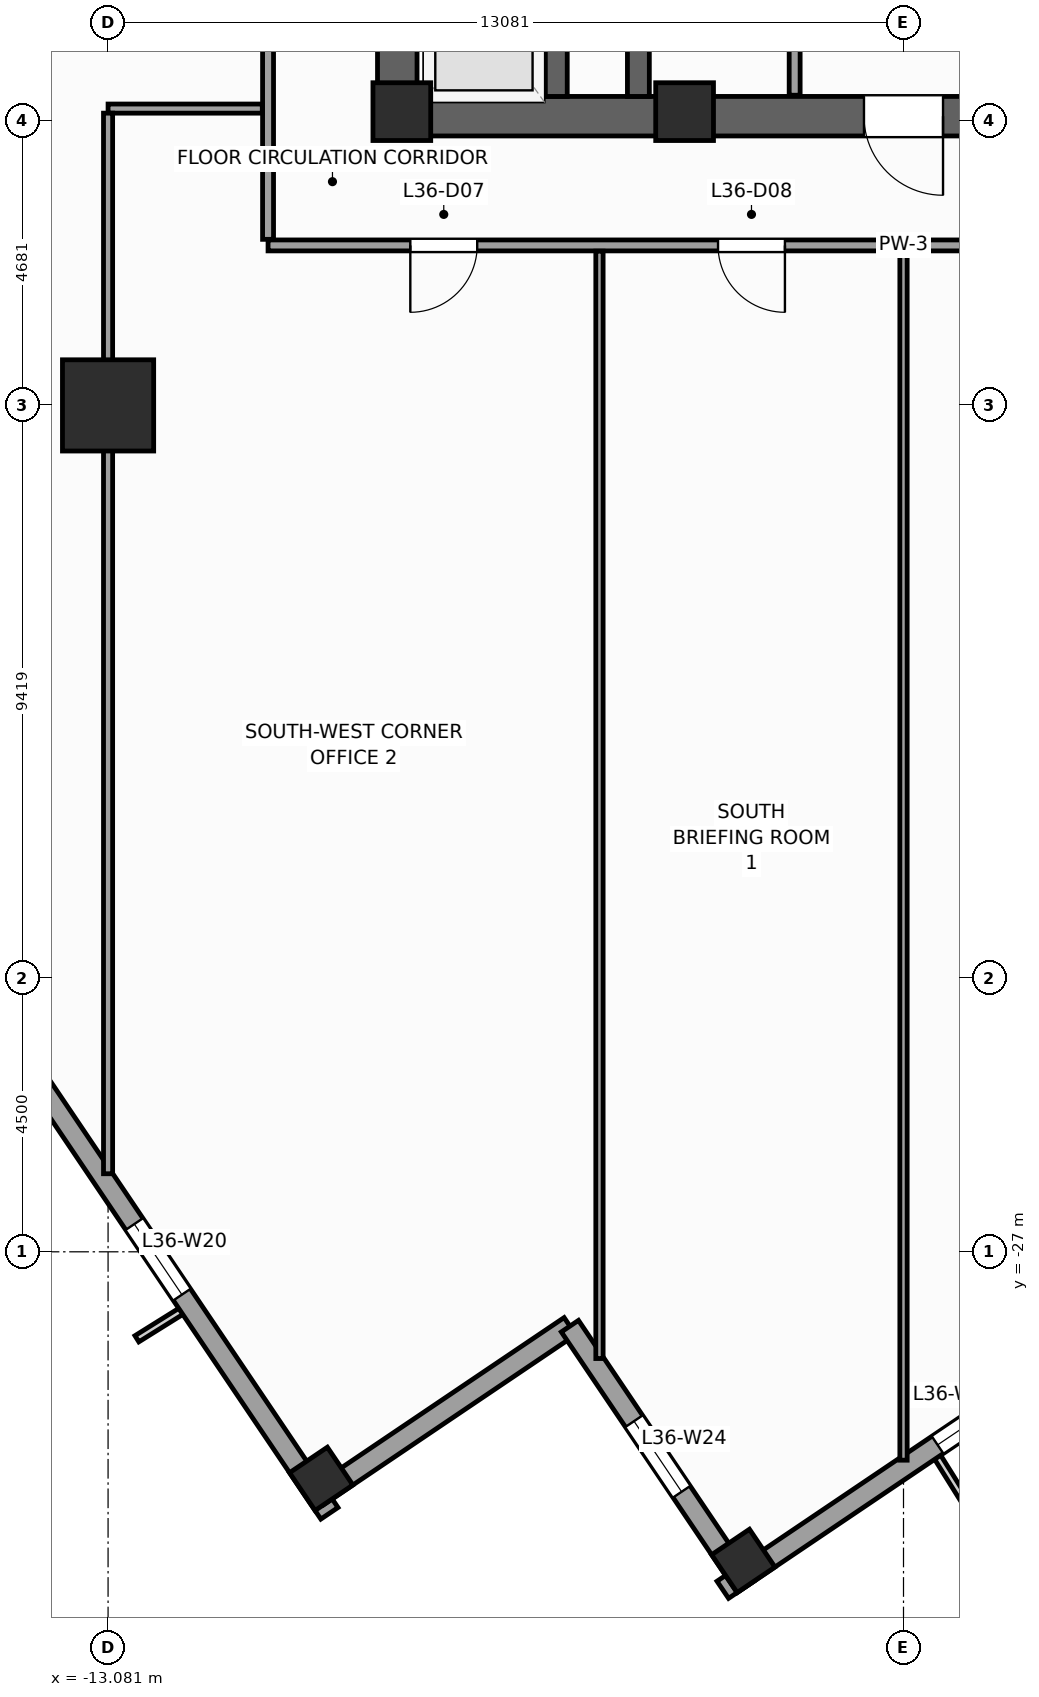
"""IFC4 building model, lengths in metres.
Left out: names, types, materials, properties, quantities, classifications, styles, units other than length and angle.
Written with IfcOpenShell. Run it as: python <this file> out.ifc"""

import sys

from ifc_helpers import new_model, si_unit, direction, frame, frame_2d, origin, origin_2d, place, context, subcontext, project, spatial, rectangle, extrude, source, transform, mapped, element, fill, save


model = new_model("IFC4")
c1 = context("Model", 3, precision=1e-05, world=origin(), true_north=direction((0.0, 1.0)))
c2 = subcontext(c1, "Body", "Model", "MODEL_VIEW")
j1 = project(units=[si_unit("LENGTHUNIT", "METRE"), si_unit("PLANEANGLEUNIT", "RADIAN")], contexts=[c1])
p1 = place(None, origin())
s1 = spatial("IfcSite", under=j1, at=p1, CompositionType="ELEMENT")
p2 = place(p1, origin())
s2 = spatial("IfcBuilding", under=s1, at=p2, CompositionType="ELEMENT")
p3 = place(p2, frame((0.0, 0.0, 152.4)))
s3 = spatial("IfcBuildingStorey", under=s2, at=p3, CompositionType="ELEMENT", Elevation=152.4)
p4 = place(p3, frame((-8.65, -8.325, 0.0), z_axis=(0.0, 0.0, 1.0), x_axis=(1.0, 0.0, 0.0)))
e1 = element("IfcWall", 1, at=p4, inside=s3, PredefinedType="SHEAR", context=c2, shape_type="SweptSolid", body=[
    extrude(rectangle(XDim=17.3, YDim=0.65, at=frame_2d((8.65, 0.0))), origin(), (0.0, 0.0, 1.0), 4.0),
])
p5 = place(p4, frame((8.0, 0.0, 0.0)))
e2 = element("IfcOpeningElement", 2, at=p5, cuts=e1, PredefinedType="OPENING", context=c2, shape_type="SweptSolid", body=[
    extrude(rectangle(XDim=1.3, YDim=2.2, at=frame_2d((0.65, 1.1))), frame((0.0, 0.335, 0.0), z_axis=(0.0, -1.0, 0.0), x_axis=(1.0, 0.0, 0.0)), (0.0, 0.0, 1.0), 0.67),
])
p6 = place(p3, frame((-8.325, -8.0, 0.0), z_axis=(0.0, 0.0, 1.0), x_axis=(0.0, 1.0, 0.0)))
e3 = element("IfcWall", 3, at=p6, inside=s3, PredefinedType="SHEAR", context=c2, shape_type="SweptSolid", body=[
    extrude(rectangle(XDim=16.0, YDim=0.65, at=frame_2d((8.0, 0.0))), origin(), (0.0, 0.0, 1.0), 4.0),
])
p7 = place(p6, frame((4.69, 0.0, 0.0)))
e4 = element("IfcOpeningElement", 4, at=p7, cuts=e3, PredefinedType="OPENING", context=c2, shape_type="SweptSolid", body=[
    extrude(rectangle(XDim=1.3, YDim=2.2, at=frame_2d((0.65, 1.1))), frame((0.0, 0.335, 0.0), z_axis=(0.0, -1.0, 0.0), x_axis=(1.0, 0.0, 0.0)), (0.0, 0.0, 1.0), 0.67),
])
p8 = place(p3, frame((-4.36, -8.0, 0.0), z_axis=(0.0, 0.0, 1.0), x_axis=(0.0, 1.0, 0.0)))
e5 = element("IfcWall", 5, at=p8, inside=s3, PredefinedType="SHEAR", context=c2, shape_type="SweptSolid", body=[
    extrude(rectangle(XDim=16.0, YDim=0.36, at=frame_2d((8.0, 0.0))), origin(), (0.0, 0.0, 1.0), 4.0),
])
p9 = place(p3, frame((-5.71, -8.0, 0.0), z_axis=(0.0, 0.0, 1.0), x_axis=(0.0, 1.0, 0.0)))
e6 = element("IfcWall", 6, at=p9, inside=s3, PredefinedType="SHEAR", context=c2, shape_type="SweptSolid", body=[
    extrude(rectangle(XDim=2.54, YDim=0.36, at=frame_2d((1.27, 0.0))), origin(), (0.0, 0.0, 1.0), 4.0),
])
m1 = source(origin(), c2, "Body", "SweptSolid", [
    extrude(rectangle(XDim=0.95, YDim=0.95, at=origin_2d()), origin(), (0.0, 0.0, 1.0), 4.0),
])
for number, where, z_axis, x_axis in (
    (7, (-8.25, -8.25, 0.0), (0.0, 0.0, 1.0), (1.0, 0.0, 0.0)),
    (8, (-3.6, -8.25, 0.0), (0.0, 0.0, 1.0), (1.0, 0.0, 0.0)),
):
    element("IfcColumn", number, at=place(p3, frame(where, z_axis=z_axis, x_axis=x_axis)), inside=s3, PredefinedType="PILASTER", context=c2, shape_type="MappedRepresentation", body=[
        mapped(m1, transform((0.0, 0.0, 0.0), scale=1.0)),
    ])
m2 = source(origin(), c2, "Body", "SweptSolid", [
    extrude(rectangle(XDim=1.5, YDim=1.5, at=origin_2d()), origin(), (0.0, 0.0, 1.0), 4.0),
])
p10 = place(p3, frame((-13.081, -13.081, 0.0), z_axis=(0.0, 0.0, 1.0), x_axis=(1.0, 0.0, 0.0)))
e9 = element("IfcColumn", 9, at=p10, inside=s3, PredefinedType="COLUMN", context=c2, shape_type="MappedRepresentation", body=[
    mapped(m2, transform((0.0, 0.0, 0.0), scale=1.0)),
])
m3 = source(origin(), c2, "Body", "SweptSolid", [
    extrude(rectangle(XDim=0.75, YDim=0.75, at=origin_2d()), origin(), (0.0, 0.0, 1.0), 4.0),
])
for number, where, z_axis, x_axis in (
    (10, (-2.635, -32.083, 0.0), (0.0, 0.0, 1.0), (0.829, 0.559, 0.0)),
    (11, (-9.576, -30.734, 0.0), (0.0, 0.0, 1.0), (0.829, 0.559, 0.0)),
):
    element("IfcColumn", number, at=place(p3, frame(where, z_axis=z_axis, x_axis=x_axis)), inside=s3, PredefinedType="COLUMN", context=c2, shape_type="MappedRepresentation", body=[
        mapped(m3, transform((0.0, 0.0, 0.0), scale=1.0)),
    ])
p11 = place(p3, frame((-2.972, -32.558, 0.0), z_axis=(0.0, 0.0, 1.0), x_axis=(0.829036218961, 0.559194910251, 0.0)))
e12 = element("IfcWall", 12, at=p11, inside=s3, PredefinedType="STANDARD", context=c2, shape_type="SweptSolid", body=[
    extrude(rectangle(XDim=41.34, YDim=0.34, at=frame_2d((20.67, 0.0))), origin(), (0.0, 0.0, 1.0), 3.04),
])
p12 = place(p11, frame((14.545, 0.0, 0.0)))
e13 = element("IfcOpeningElement", 13, at=p12, cuts=e12, PredefinedType="OPENING", context=c2, shape_type="SweptSolid", body=[
    extrude(rectangle(XDim=1.05, YDim=2.25, at=frame_2d((0.525, 1.125))), frame((0.0, 0.18, 0.0), z_axis=(0.0, -1.0, 0.0), x_axis=(1.0, 0.0, 0.0)), (0.0, 0.0, 1.0), 0.36),
])
p13 = place(p11, frame((4.261, 0.0, 0.56)))
e14 = element("IfcOpeningElement", 14, at=p13, cuts=e12, PredefinedType="OPENING", context=c2, shape_type="SweptSolid", body=[
    extrude(rectangle(XDim=1.4, YDim=2.4, at=frame_2d((0.7, 1.2))), frame((0.0, 0.18, 0.0), z_axis=(0.0, -1.0, 0.0), x_axis=(1.0, 0.0, 0.0)), (0.0, 0.0, 1.0), 0.36),
])
p14 = place(p11, frame((11.064, 0.0, 0.61)))
e15 = element("IfcOpeningElement", 15, at=p14, cuts=e12, PredefinedType="OPENING", context=c2, shape_type="SweptSolid", body=[
    extrude(rectangle(XDim=1.85, YDim=2.35, at=frame_2d((0.925, 1.175))), frame((0.0, 0.18, 0.0), z_axis=(0.0, -1.0, 0.0), x_axis=(1.0, 0.0, 0.0)), (0.0, 0.0, 1.0), 0.36),
])
p15 = place(p11, frame((18.168, 0.0, 0.61)))
e16 = element("IfcOpeningElement", 16, at=p15, cuts=e12, PredefinedType="OPENING", context=c2, shape_type="SweptSolid", body=[
    extrude(rectangle(XDim=1.85, YDim=2.35, at=frame_2d((0.925, 1.175))), frame((0.0, 0.18, 0.0), z_axis=(0.0, -1.0, 0.0), x_axis=(1.0, 0.0, 0.0)), (0.0, 0.0, 1.0), 0.36),
])
p16 = place(p11, frame((27.186, 0.0, 0.61)))
e17 = element("IfcOpeningElement", 17, at=p16, cuts=e12, PredefinedType="OPENING", context=c2, shape_type="SweptSolid", body=[
    extrude(rectangle(XDim=1.85, YDim=2.35, at=frame_2d((0.925, 1.175))), frame((0.0, 0.18, 0.0), z_axis=(0.0, -1.0, 0.0), x_axis=(1.0, 0.0, 0.0)), (0.0, 0.0, 1.0), 0.36),
])
p17 = place(p11, frame((34.852, 0.0, 0.56)))
e18 = element("IfcOpeningElement", 18, at=p17, cuts=e12, PredefinedType="OPENING", context=c2, shape_type="SweptSolid", body=[
    extrude(rectangle(XDim=1.4, YDim=2.4, at=frame_2d((0.7, 1.2))), frame((0.0, 0.18, 0.0), z_axis=(0.0, -1.0, 0.0), x_axis=(1.0, 0.0, 0.0)), (0.0, 0.0, 1.0), 0.36),
])
p18 = place(p3, frame((-32.558, 2.972, 0.0), z_axis=(0.0, 0.0, 1.0), x_axis=(0.559194910251, -0.829036218961, 0.0)))
e19 = element("IfcWall", 19, at=p18, inside=s3, PredefinedType="STANDARD", context=c2, shape_type="SweptSolid", body=[
    extrude(rectangle(XDim=41.34, YDim=0.34, at=frame_2d((20.67, 0.0))), origin(), (0.0, 0.0, 1.0), 3.04),
])
p19 = place(p18, frame((3.511, 0.0, 0.56)))
e20 = element("IfcOpeningElement", 20, at=p19, cuts=e19, PredefinedType="OPENING", context=c2, shape_type="SweptSolid", body=[
    extrude(rectangle(XDim=1.4, YDim=2.4, at=frame_2d((0.7, 1.2))), frame((0.0, 0.18, 0.0), z_axis=(0.0, -1.0, 0.0), x_axis=(1.0, 0.0, 0.0)), (0.0, 0.0, 1.0), 0.36),
])
p20 = place(p18, frame((11.064, 0.0, 0.61)))
e21 = element("IfcOpeningElement", 21, at=p20, cuts=e19, PredefinedType="OPENING", context=c2, shape_type="SweptSolid", body=[
    extrude(rectangle(XDim=1.85, YDim=2.35, at=frame_2d((0.925, 1.175))), frame((0.0, 0.18, 0.0), z_axis=(0.0, -1.0, 0.0), x_axis=(1.0, 0.0, 0.0)), (0.0, 0.0, 1.0), 0.36),
])
p21 = place(p18, frame((18.168, 0.0, 0.61)))
e22 = element("IfcOpeningElement", 22, at=p21, cuts=e19, PredefinedType="OPENING", context=c2, shape_type="SweptSolid", body=[
    extrude(rectangle(XDim=1.85, YDim=2.35, at=frame_2d((0.925, 1.175))), frame((0.0, 0.18, 0.0), z_axis=(0.0, -1.0, 0.0), x_axis=(1.0, 0.0, 0.0)), (0.0, 0.0, 1.0), 0.36),
])
p22 = place(p18, frame((27.186, 0.0, 0.61)))
e23 = element("IfcOpeningElement", 23, at=p22, cuts=e19, PredefinedType="OPENING", context=c2, shape_type="SweptSolid", body=[
    extrude(rectangle(XDim=1.85, YDim=2.35, at=frame_2d((0.925, 1.175))), frame((0.0, 0.18, 0.0), z_axis=(0.0, -1.0, 0.0), x_axis=(1.0, 0.0, 0.0)), (0.0, 0.0, 1.0), 0.36),
])
p23 = place(p18, frame((35.602, 0.0, 0.56)))
e24 = element("IfcOpeningElement", 24, at=p23, cuts=e19, PredefinedType="OPENING", context=c2, shape_type="SweptSolid", body=[
    extrude(rectangle(XDim=1.4, YDim=2.4, at=frame_2d((0.7, 1.2))), frame((0.0, 0.18, 0.0), z_axis=(0.0, -1.0, 0.0), x_axis=(1.0, 0.0, 0.0)), (0.0, 0.0, 1.0), 0.36),
])
p24 = place(p3, frame((-9.631, -31.019, 0.0), z_axis=(0.0, 0.0, 1.0), x_axis=(0.829025804298, 0.559210350234, 0.0)))
e25 = element("IfcWall", 25, at=p24, inside=s3, PredefinedType="STANDARD", context=c2, shape_type="SweptSolid", body=[
    extrude(rectangle(XDim=5.0, YDim=0.34, at=frame_2d((2.5, 0.0))), origin(), (0.0, 0.0, 1.0), 3.74),
])
p25 = place(p3, frame((-5.486, -28.223, 0.0), z_axis=(0.0, 0.0, 1.0), x_axis=(0.559171107879, -0.82905227345, 0.0)))
e26 = element("IfcWall", 26, at=p25, inside=s3, PredefinedType="STANDARD", context=c2, shape_type="SweptSolid", body=[
    extrude(rectangle(XDim=5.17, YDim=0.34, at=frame_2d((2.585, 0.0))), origin(), (0.0, 0.0, 1.0), 3.04),
])
p26 = place(p25, frame((1.885, 0.0, 0.56)))
e27 = element("IfcOpeningElement", 27, at=p26, cuts=e26, PredefinedType="OPENING", context=c2, shape_type="SweptSolid", body=[
    extrude(rectangle(XDim=1.4, YDim=2.4, at=frame_2d((0.7, 1.2))), frame((0.0, 0.18, 0.0), z_axis=(0.0, -1.0, 0.0), x_axis=(1.0, 0.0, 0.0)), (0.0, 0.0, 1.0), 0.36),
])
p27 = place(p3, frame((-1.79, -7.98, 0.0), z_axis=(0.0, 0.0, 1.0), x_axis=(0.0, 1.0, 0.0)))
e28 = element("IfcWall", 28, at=p27, inside=s3, PredefinedType="PARTITIONING", context=c2, shape_type="SweptSolid", body=[
    extrude(rectangle(XDim=12.38, YDim=0.18, at=frame_2d((6.19, 0.0))), origin(), (0.0, 0.0, 1.0), 3.74),
])
p28 = place(p27, frame((4.6, 0.0, 0.0)))
e29 = element("IfcOpeningElement", 29, at=p28, cuts=e28, PredefinedType="OPENING", context=c2, shape_type="SweptSolid", body=[
    extrude(rectangle(XDim=1.1, YDim=2.2, at=frame_2d((0.55, 1.1))), frame((0.0, 0.1, 0.0), z_axis=(0.0, -1.0, 0.0), x_axis=(1.0, 0.0, 0.0)), (0.0, 0.0, 1.0), 0.2),
])
p29 = place(p27, frame((6.66, 0.0, 0.0)))
e30 = element("IfcOpeningElement", 30, at=p29, cuts=e28, PredefinedType="OPENING", context=c2, shape_type="SweptSolid", body=[
    extrude(rectangle(XDim=1.1, YDim=2.2, at=frame_2d((0.55, 1.1))), frame((0.0, 0.1, 0.0), z_axis=(0.0, -1.0, 0.0), x_axis=(1.0, 0.0, 0.0)), (0.0, 0.0, 1.0), 0.2),
])
p30 = place(p27, frame((1.4, 0.0, 0.0)))
e31 = element("IfcOpeningElement", 31, at=p30, cuts=e28, PredefinedType="OPENING", context=c2, shape_type="SweptSolid", body=[
    extrude(rectangle(XDim=1.15, YDim=2.25, at=frame_2d((0.575, 1.125))), frame((0.0, 0.1, 0.0), z_axis=(0.0, -1.0, 0.0), x_axis=(1.0, 0.0, 0.0)), (0.0, 0.0, 1.0), 0.2),
])
p31 = place(p3, frame((-10.45, -10.45, 0.0), z_axis=(0.0, 0.0, 1.0), x_axis=(1.0, 0.0, 0.0)))
e32 = element("IfcWall", 32, at=p31, inside=s3, PredefinedType="PARTITIONING", context=c2, shape_type="SweptSolid", body=[
    extrude(rectangle(XDim=20.9, YDim=0.18, at=frame_2d((10.45, 0.0))), origin(), (0.0, 0.0, 1.0), 3.74),
])
p32 = place(p31, frame((2.339, 0.0, 0.0)))
e33 = element("IfcOpeningElement", 33, at=p32, cuts=e32, PredefinedType="OPENING", context=c2, shape_type="SweptSolid", body=[
    extrude(rectangle(XDim=1.1, YDim=2.2, at=frame_2d((0.55, 1.1))), frame((0.0, 0.1, 0.0), z_axis=(0.0, -1.0, 0.0), x_axis=(1.0, 0.0, 0.0)), (0.0, 0.0, 1.0), 0.2),
])
p33 = place(p31, frame((7.4, 0.0, 0.0)))
e34 = element("IfcOpeningElement", 34, at=p33, cuts=e32, PredefinedType="OPENING", context=c2, shape_type="SweptSolid", body=[
    extrude(rectangle(XDim=1.1, YDim=2.2, at=frame_2d((0.55, 1.1))), frame((0.0, 0.1, 0.0), z_axis=(0.0, -1.0, 0.0), x_axis=(1.0, 0.0, 0.0)), (0.0, 0.0, 1.0), 0.2),
])
p34 = place(p31, frame((12.4, 0.0, 0.0)))
e35 = element("IfcOpeningElement", 35, at=p34, cuts=e32, PredefinedType="OPENING", context=c2, shape_type="SweptSolid", body=[
    extrude(rectangle(XDim=1.1, YDim=2.2, at=frame_2d((0.55, 1.1))), frame((0.0, 0.1, 0.0), z_axis=(0.0, -1.0, 0.0), x_axis=(1.0, 0.0, 0.0)), (0.0, 0.0, 1.0), 0.2),
])
p35 = place(p31, frame((17.46, 0.0, 0.0)))
e36 = element("IfcOpeningElement", 36, at=p35, cuts=e32, PredefinedType="OPENING", context=c2, shape_type="SweptSolid", body=[
    extrude(rectangle(XDim=1.1, YDim=2.2, at=frame_2d((0.55, 1.1))), frame((0.0, 0.1, 0.0), z_axis=(0.0, -1.0, 0.0), x_axis=(1.0, 0.0, 0.0)), (0.0, 0.0, 1.0), 0.2),
])
p36 = place(p3, frame((-10.45, -10.35, 0.0), z_axis=(0.0, 0.0, 1.0), x_axis=(0.0, 1.0, 0.0)))
e37 = element("IfcWall", 37, at=p36, inside=s3, PredefinedType="PARTITIONING", context=c2, shape_type="SweptSolid", body=[
    extrude(rectangle(XDim=8.95, YDim=0.18, at=frame_2d((4.475, 0.0))), origin(), (0.0, 0.0, 1.0), 3.74),
])
p37 = place(p36, frame((6.436, 0.0, 0.0)))
e38 = element("IfcOpeningElement", 38, at=p37, cuts=e37, PredefinedType="OPENING", context=c2, shape_type="SweptSolid", body=[
    extrude(rectangle(XDim=1.1, YDim=2.2, at=frame_2d((0.55, 1.1))), frame((0.0, 0.1, 0.0), z_axis=(0.0, -1.0, 0.0), x_axis=(1.0, 0.0, 0.0)), (0.0, 0.0, 1.0), 0.2),
])
p38 = place(p36, frame((3.2, 0.0, 0.0)))
e39 = element("IfcOpeningElement", 39, at=p38, cuts=e37, PredefinedType="OPENING", context=c2, shape_type="SweptSolid", body=[
    extrude(rectangle(XDim=1.1, YDim=2.2, at=frame_2d((0.55, 1.1))), frame((0.0, 0.1, 0.0), z_axis=(0.0, -1.0, 0.0), x_axis=(1.0, 0.0, 0.0)), (0.0, 0.0, 1.0), 0.2),
])
p39 = place(p3, frame((-10.545, -8.2, 0.0), z_axis=(0.0, 0.0, 1.0), x_axis=(-1.0, 0.0, 0.0)))
e40 = element("IfcWall", 40, at=p39, inside=s3, PredefinedType="PARTITIONING", context=c2, shape_type="SweptSolid", body=[
    extrude(rectangle(XDim=2.536, YDim=0.15, at=frame_2d((1.268, 0.0))), origin(), (0.0, 0.0, 1.0), 3.74),
])
p40 = place(p3, frame((-13.081, -8.275, 0.0), z_axis=(0.0, 0.0, 1.0), x_axis=(0.0, -1.0, 0.0)))
e41 = element("IfcWall", 41, at=p40, inside=s3, PredefinedType="PARTITIONING", context=c2, shape_type="SweptSolid", body=[
    extrude(rectangle(XDim=17.441, YDim=0.15, at=frame_2d((8.721, 0.0))), origin(), (0.0, 0.0, 1.0), 2.84),
])
p41 = place(p3, frame((-5.0, -28.755, 0.0), z_axis=(0.0, 0.0, 1.0), x_axis=(0.0, 1.0, 0.0)))
e42 = element("IfcWall", 42, at=p41, inside=s3, PredefinedType="PARTITIONING", context=c2, shape_type="SweptSolid", body=[
    extrude(rectangle(XDim=18.21, YDim=0.12, at=frame_2d((9.105, 0.0))), origin(), (0.0, 0.0, 1.0), 3.74),
])
p42 = place(p3, frame((0.0, -30.427, 0.0), z_axis=(0.0, 0.0, 1.0), x_axis=(0.0, 1.0, 0.0)))
e43 = element("IfcWall", 43, at=p42, inside=s3, PredefinedType="PARTITIONING", context=c2, shape_type="SweptSolid", body=[
    extrude(rectangle(XDim=19.882, YDim=0.12, at=frame_2d((9.941, 0.0))), origin(), (0.0, 0.0, 1.0), 3.74),
])
m4 = source(origin(), c2, "Body", "SweptSolid", [
    extrude(rectangle(XDim=1.4, YDim=2.4, at=frame_2d((0.7, 1.2))), frame((0.0, 0.03, 0.0), z_axis=(0.0, -1.0, 0.0), x_axis=(1.0, 0.0, 0.0)), (0.0, 0.0, 1.0), 0.06),
])
p43 = place(p13, origin())
e44 = element("IfcWindow", 44, at=p43, inside=s3, PartitioningType="SINGLE_PANEL", PredefinedType="WINDOW", context=c2, shape_type="MappedRepresentation", body=[
    mapped(m4, transform((0.0, 0.0, 0.0), scale=1.0)),
])
fill(e14, e44)
p44 = place(p23, origin())
e45 = element("IfcWindow", 45, at=p44, inside=s3, PartitioningType="SINGLE_PANEL", PredefinedType="WINDOW", context=c2, shape_type="MappedRepresentation", body=[
    mapped(m4, transform((0.0, 0.0, 0.0), scale=1.0)),
])
fill(e24, e45)
p45 = place(p26, origin())
e46 = element("IfcWindow", 46, at=p45, inside=s3, PartitioningType="SINGLE_PANEL", PredefinedType="WINDOW", context=c2, shape_type="MappedRepresentation", body=[
    mapped(m4, transform((0.0, 0.0, 0.0), scale=1.0)),
])
fill(e27, e46)
m5 = source(origin(), c2, "Body", "SweptSolid", [
    extrude(rectangle(XDim=1.3, YDim=2.2, at=frame_2d((0.65, 1.1))), frame((0.0, 0.025, 0.0), z_axis=(0.0, -1.0, 0.0), x_axis=(1.0, 0.0, 0.0)), (0.0, 0.0, 1.0), 0.05),
])
p46 = place(p5, frame((1.3, 0.0, 0.0), z_axis=(0.0, 0.0, 1.0), x_axis=(-1.0, 0.0, 0.0)))
e47 = element("IfcDoor", 47, at=p46, inside=s3, OperationType="SINGLE_SWING_RIGHT", PredefinedType="DOOR", context=c2, shape_type="MappedRepresentation", body=[
    mapped(m5, transform((0.0, 0.0, 0.0), scale=1.0)),
])
fill(e2, e47)
m6 = source(origin(), c2, "Body", "SweptSolid", [
    extrude(rectangle(XDim=1.1, YDim=2.2, at=frame_2d((0.55, 1.1))), frame((0.0, 0.025, 0.0), z_axis=(0.0, -1.0, 0.0), x_axis=(1.0, 0.0, 0.0)), (0.0, 0.0, 1.0), 0.05),
])
p47 = place(p32, frame((1.1, 0.0, 0.0), z_axis=(0.0, 0.0, 1.0), x_axis=(-1.0, 0.0, 0.0)))
e48 = element("IfcDoor", 48, at=p47, inside=s3, OperationType="SINGLE_SWING_LEFT", PredefinedType="DOOR", context=c2, shape_type="MappedRepresentation", body=[
    mapped(m6, transform((0.0, 0.0, 0.0), scale=1.0)),
])
fill(e33, e48)
p48 = place(p33, frame((1.1, 0.0, 0.0), z_axis=(0.0, 0.0, 1.0), x_axis=(-1.0, 0.0, 0.0)))
e49 = element("IfcDoor", 49, at=p48, inside=s3, OperationType="SINGLE_SWING_RIGHT", PredefinedType="DOOR", context=c2, shape_type="MappedRepresentation", body=[
    mapped(m6, transform((0.0, 0.0, 0.0), scale=1.0)),
])
fill(e34, e49)
save(model, sys.argv[1])
